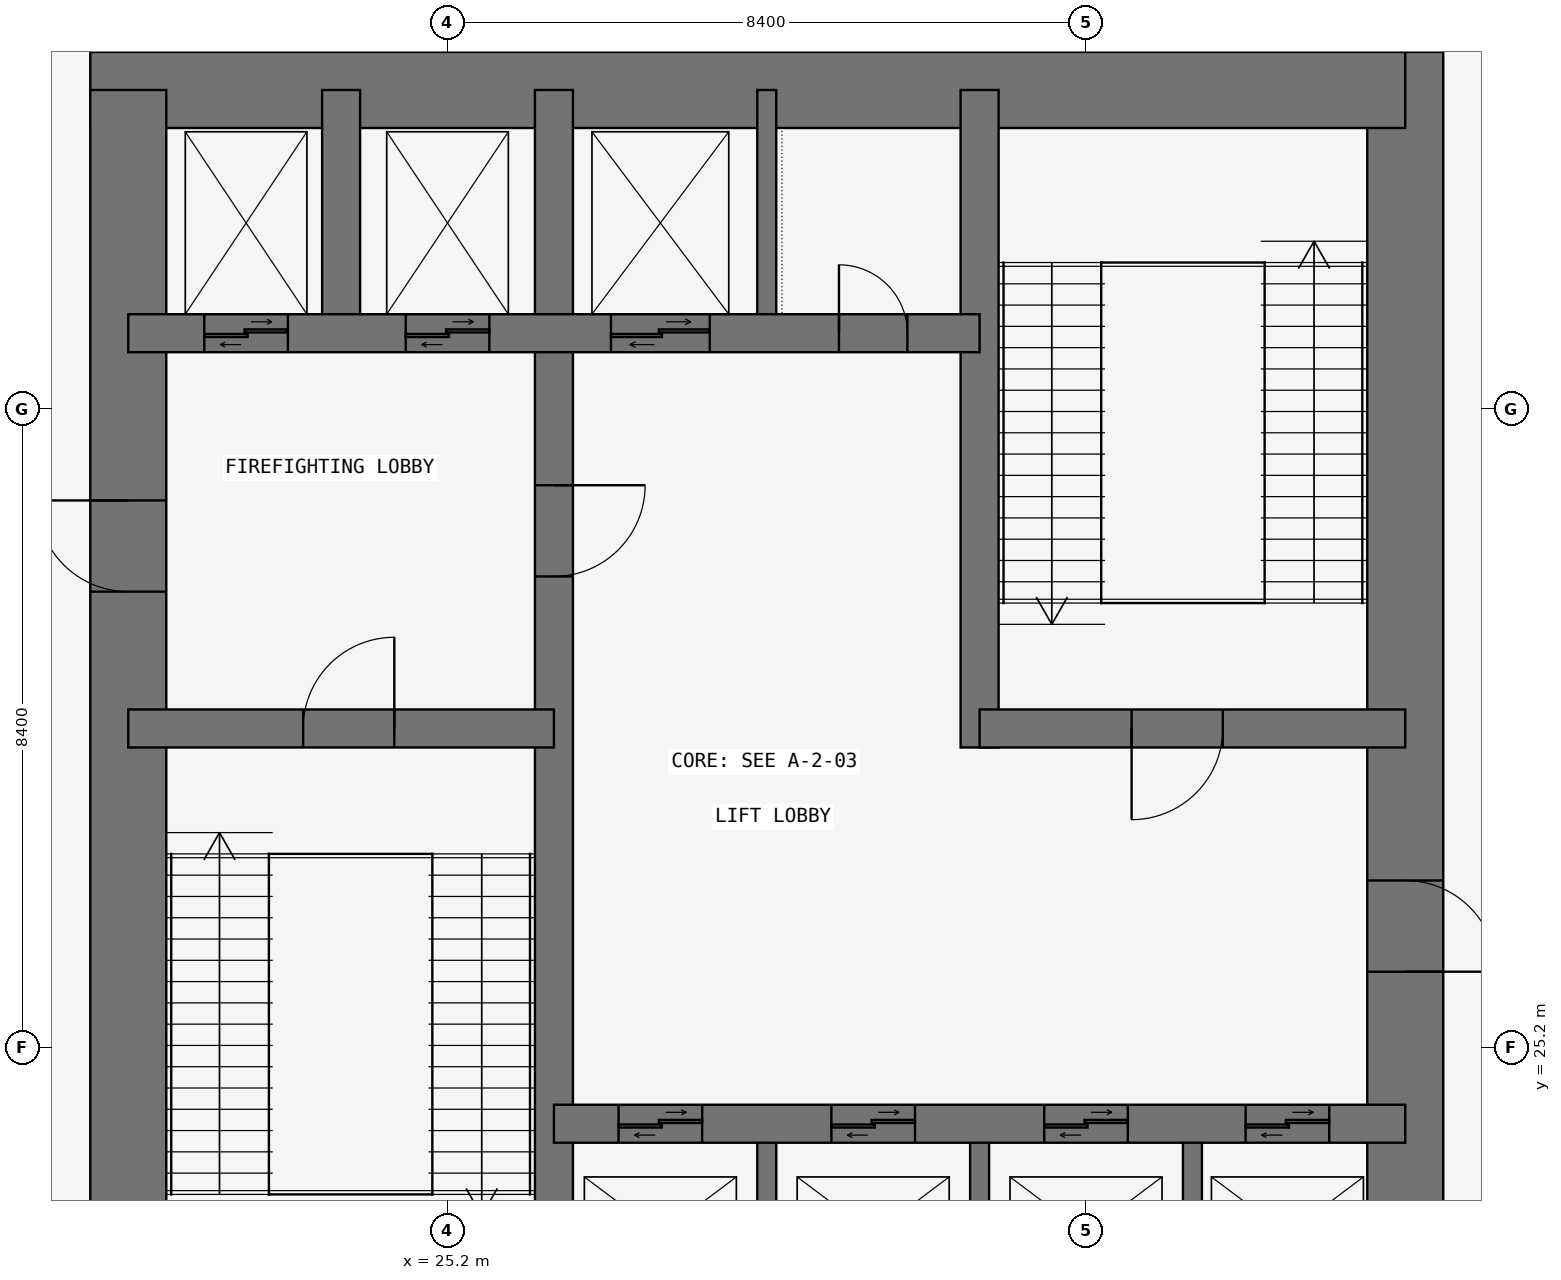
"""IFC4 building model, lengths in metres.
Left out: names, types, materials, properties, quantities, classifications, styles, units other than length and angle.
Written with IfcOpenShell. Run it as: python <this file> out.ifc"""

import sys

from ifc_helpers import new_model, si_unit, direction, frame, frame_2d, origin, place, context, subcontext, project, spatial, rectangle, extrude, element, fill, save


model = new_model("IFC4")
c1 = context("Model", 3, precision=1e-05, world=origin(), true_north=direction((0.0, 1.0)))
c2 = subcontext(c1, "Body", "Model", "MODEL_VIEW")
j1 = project(units=[si_unit("LENGTHUNIT", "METRE"), si_unit("PLANEANGLEUNIT", "RADIAN")], contexts=[c1])
p1 = place(None, origin())
s1 = spatial("IfcSite", under=j1, at=p1, CompositionType="ELEMENT")
p2 = place(p1, origin())
s2 = spatial("IfcBuilding", under=s1, at=p2, CompositionType="ELEMENT")
p3 = place(p2, origin())
s3 = spatial("IfcBuildingStorey", under=s2, at=p3, CompositionType="ELEMENT", Elevation=0.0)
p4 = place(p3, frame((37.8, 21.0, 0.0), z_axis=(0.0, 0.0, 1.0), x_axis=(0.0, 1.0, 0.0)))
e1 = element("IfcWall", 1, at=p4, inside=s3, PredefinedType="SHEAR", context=c2, shape_type="SweptSolid", body=[
    extrude(rectangle(XDim=17.3, YDim=1.0, at=frame_2d((8.65, 0.0))), origin(), (0.0, 0.0, 1.0), 6.0),
])
p5 = place(p4, frame((5.2, 0.0, 0.0)))
e2 = element("IfcOpeningElement", 2, at=p5, cuts=e1, PredefinedType="OPENING", context=c2, shape_type="SweptSolid", body=[
    extrude(rectangle(XDim=1.2, YDim=2.1, at=frame_2d((0.6, 1.05))), frame((0.0, 0.51, 0.0), z_axis=(0.0, -1.0, 0.0), x_axis=(1.0, 0.0, 0.0)), (0.0, 0.0, 1.0), 1.02),
])
p6 = place(p3, frame((37.8, 37.8, 0.0), z_axis=(0.0, 0.0, 1.0), x_axis=(-1.0, 0.0, 0.0)))
e3 = element("IfcWall", 3, at=p6, inside=s3, PredefinedType="SHEAR", context=c2, shape_type="SweptSolid", body=[
    extrude(rectangle(XDim=17.3, YDim=1.0, at=frame_2d((8.65, 0.0))), origin(), (0.0, 0.0, 1.0), 6.0),
])
p7 = place(p3, frame((21.0, 37.8, 0.0), z_axis=(0.0, 0.0, 1.0), x_axis=(0.0, -1.0, 0.0)))
e4 = element("IfcWall", 4, at=p7, inside=s3, PredefinedType="SHEAR", context=c2, shape_type="SweptSolid", body=[
    extrude(rectangle(XDim=17.3, YDim=1.0, at=frame_2d((8.65, 0.0))), origin(), (0.0, 0.0, 1.0), 6.0),
])
p8 = place(p7, frame((5.4, 0.0, 0.0)))
e5 = element("IfcOpeningElement", 5, at=p8, cuts=e4, PredefinedType="OPENING", context=c2, shape_type="SweptSolid", body=[
    extrude(rectangle(XDim=1.2, YDim=2.1, at=frame_2d((0.6, 1.05))), frame((0.0, 0.51, 0.0), z_axis=(0.0, -1.0, 0.0), x_axis=(1.0, 0.0, 0.0)), (0.0, 0.0, 1.0), 1.02),
])
p9 = place(p3, frame((26.6, 21.0, 0.0), z_axis=(0.0, 0.0, 1.0), x_axis=(0.0, 1.0, 0.0)))
e6 = element("IfcWall", 6, at=p9, inside=s3, PredefinedType="SHEAR", context=c2, shape_type="SweptSolid", body=[
    extrude(rectangle(XDim=16.8, YDim=0.5, at=frame_2d((8.4, 0.0))), origin(), (0.0, 0.0, 1.0), 6.0),
])
p10 = place(p9, frame((10.4, 0.0, 0.0)))
e7 = element("IfcOpeningElement", 7, at=p10, cuts=e6, PredefinedType="OPENING", context=c2, shape_type="SweptSolid", body=[
    extrude(rectangle(XDim=1.2, YDim=2.1, at=frame_2d((0.6, 1.05))), frame((0.0, 0.26, 0.0), z_axis=(0.0, -1.0, 0.0), x_axis=(1.0, 0.0, 0.0)), (0.0, 0.0, 1.0), 0.52),
])
p11 = place(p3, frame((21.0, 29.4, 0.0), z_axis=(0.0, 0.0, 1.0), x_axis=(1.0, 0.0, 0.0)))
e8 = element("IfcWall", 8, at=p11, inside=s3, PredefinedType="SHEAR", context=c2, shape_type="SweptSolid", body=[
    extrude(rectangle(XDim=5.6, YDim=0.5, at=frame_2d((2.8, 0.0))), origin(), (0.0, 0.0, 1.0), 6.0),
])
p12 = place(p11, frame((2.3, 0.0, 0.0)))
e9 = element("IfcOpeningElement", 9, at=p12, cuts=e8, PredefinedType="OPENING", context=c2, shape_type="SweptSolid", body=[
    extrude(rectangle(XDim=1.2, YDim=2.1, at=frame_2d((0.6, 1.05))), frame((0.0, 0.26, 0.0), z_axis=(0.0, -1.0, 0.0), x_axis=(1.0, 0.0, 0.0)), (0.0, 0.0, 1.0), 0.52),
])
p13 = place(p3, frame((21.0, 34.6, 0.0), z_axis=(0.0, 0.0, 1.0), x_axis=(1.0, 0.0, 0.0)))
e10 = element("IfcWall", 10, at=p13, inside=s3, PredefinedType="SHEAR", context=c2, shape_type="SweptSolid", body=[
    extrude(rectangle(XDim=11.2, YDim=0.5, at=frame_2d((5.6, 0.0))), origin(), (0.0, 0.0, 1.0), 6.0),
])
p14 = place(p13, frame((9.35, 0.0, 0.0)))
e11 = element("IfcOpeningElement", 11, at=p14, cuts=e10, PredefinedType="OPENING", context=c2, shape_type="SweptSolid", body=[
    extrude(rectangle(XDim=0.9, YDim=2.1, at=frame_2d((0.45, 1.05))), frame((0.0, 0.26, 0.0), z_axis=(0.0, -1.0, 0.0), x_axis=(1.0, 0.0, 0.0)), (0.0, 0.0, 1.0), 0.52),
])
p15 = place(p13, frame((1.0, 0.0, 0.0)))
e12 = element("IfcOpeningElement", 12, at=p15, cuts=e10, PredefinedType="OPENING", context=c2, shape_type="SweptSolid", body=[
    extrude(rectangle(XDim=1.1, YDim=2.1, at=frame_2d((0.55, 1.05))), frame((0.0, 0.26, 0.0), z_axis=(0.0, -1.0, 0.0), x_axis=(1.0, 0.0, 0.0)), (0.0, 0.0, 1.0), 0.52),
])
p16 = place(p13, frame((3.65, 0.0, 0.0)))
e13 = element("IfcOpeningElement", 13, at=p16, cuts=e10, PredefinedType="OPENING", context=c2, shape_type="SweptSolid", body=[
    extrude(rectangle(XDim=1.1, YDim=2.1, at=frame_2d((0.55, 1.05))), frame((0.0, 0.26, 0.0), z_axis=(0.0, -1.0, 0.0), x_axis=(1.0, 0.0, 0.0)), (0.0, 0.0, 1.0), 0.52),
])
p17 = place(p13, frame((6.35, 0.0, 0.0)))
e14 = element("IfcOpeningElement", 14, at=p17, cuts=e10, PredefinedType="OPENING", context=c2, shape_type="SweptSolid", body=[
    extrude(rectangle(XDim=1.3, YDim=2.1, at=frame_2d((0.65, 1.05))), frame((0.0, 0.26, 0.0), z_axis=(0.0, -1.0, 0.0), x_axis=(1.0, 0.0, 0.0)), (0.0, 0.0, 1.0), 0.52),
])
p18 = place(p3, frame((23.8, 34.6, 0.0), z_axis=(0.0, 0.0, 1.0), x_axis=(0.0, 1.0, 0.0)))
e15 = element("IfcWall", 15, at=p18, inside=s3, PredefinedType="SHEAR", context=c2, shape_type="SweptSolid", body=[
    extrude(rectangle(XDim=3.2, YDim=0.5, at=frame_2d((1.6, 0.0))), origin(), (0.0, 0.0, 1.0), 6.0),
])
p19 = place(p3, frame((26.6, 24.2, 0.0), z_axis=(0.0, 0.0, 1.0), x_axis=(1.0, 0.0, 0.0)))
e16 = element("IfcWall", 16, at=p19, inside=s3, PredefinedType="SHEAR", context=c2, shape_type="SweptSolid", body=[
    extrude(rectangle(XDim=11.2, YDim=0.5, at=frame_2d((5.6, 0.0))), origin(), (0.0, 0.0, 1.0), 6.0),
])
p20 = place(p19, frame((0.85, 0.0, 0.0)))
e17 = element("IfcOpeningElement", 17, at=p20, cuts=e16, PredefinedType="OPENING", context=c2, shape_type="SweptSolid", body=[
    extrude(rectangle(XDim=1.1, YDim=2.1, at=frame_2d((0.55, 1.05))), frame((0.0, 0.26, 0.0), z_axis=(0.0, -1.0, 0.0), x_axis=(1.0, 0.0, 0.0)), (0.0, 0.0, 1.0), 0.52),
])
p21 = place(p19, frame((3.65, 0.0, 0.0)))
e18 = element("IfcOpeningElement", 18, at=p21, cuts=e16, PredefinedType="OPENING", context=c2, shape_type="SweptSolid", body=[
    extrude(rectangle(XDim=1.1, YDim=2.1, at=frame_2d((0.55, 1.05))), frame((0.0, 0.26, 0.0), z_axis=(0.0, -1.0, 0.0), x_axis=(1.0, 0.0, 0.0)), (0.0, 0.0, 1.0), 0.52),
])
p22 = place(p19, frame((6.45, 0.0, 0.0)))
e19 = element("IfcOpeningElement", 19, at=p22, cuts=e16, PredefinedType="OPENING", context=c2, shape_type="SweptSolid", body=[
    extrude(rectangle(XDim=1.1, YDim=2.1, at=frame_2d((0.55, 1.05))), frame((0.0, 0.26, 0.0), z_axis=(0.0, -1.0, 0.0), x_axis=(1.0, 0.0, 0.0)), (0.0, 0.0, 1.0), 0.52),
])
p23 = place(p19, frame((9.1, 0.0, 0.0)))
e20 = element("IfcOpeningElement", 20, at=p23, cuts=e16, PredefinedType="OPENING", context=c2, shape_type="SweptSolid", body=[
    extrude(rectangle(XDim=1.1, YDim=2.1, at=frame_2d((0.55, 1.05))), frame((0.0, 0.26, 0.0), z_axis=(0.0, -1.0, 0.0), x_axis=(1.0, 0.0, 0.0)), (0.0, 0.0, 1.0), 0.52),
])
p24 = place(p3, frame((32.2, 29.15, 0.0), z_axis=(0.0, 0.0, 1.0), x_axis=(0.0, 1.0, 0.0)))
e21 = element("IfcWall", 21, at=p24, inside=s3, PredefinedType="SHEAR", context=c2, shape_type="SweptSolid", body=[
    extrude(rectangle(XDim=8.65, YDim=0.5, at=frame_2d((4.325, 0.0))), origin(), (0.0, 0.0, 1.0), 6.0),
])
p25 = place(p3, frame((32.2, 29.4, 0.0), z_axis=(0.0, 0.0, 1.0), x_axis=(1.0, 0.0, 0.0)))
e22 = element("IfcWall", 22, at=p25, inside=s3, PredefinedType="SHEAR", context=c2, shape_type="SweptSolid", body=[
    extrude(rectangle(XDim=5.6, YDim=0.5, at=frame_2d((2.8, 0.0))), origin(), (0.0, 0.0, 1.0), 6.0),
])
p26 = place(p25, frame((2.0, 0.0, 0.0)))
e23 = element("IfcOpeningElement", 23, at=p26, cuts=e22, PredefinedType="OPENING", context=c2, shape_type="SweptSolid", body=[
    extrude(rectangle(XDim=1.2, YDim=2.1, at=frame_2d((0.6, 1.05))), frame((0.0, 0.26, 0.0), z_axis=(0.0, -1.0, 0.0), x_axis=(1.0, 0.0, 0.0)), (0.0, 0.0, 1.0), 0.52),
])
for number, where, z_axis, x_axis in (
    (24, (29.4, 21.0, 0.0), (0.0, 0.0, 1.0), (0.0, 1.0, 0.0)),
    (25, (32.2, 21.0, 0.0), (0.0, 0.0, 1.0), (0.0, 1.0, 0.0)),
    (26, (35.0, 21.0, 0.0), (0.0, 0.0, 1.0), (0.0, 1.0, 0.0)),
    (27, (29.4, 34.6, 0.0), (0.0, 0.0, 1.0), (0.0, 1.0, 0.0)),
):
    element("IfcWall", number, at=place(p3, frame(where, z_axis=z_axis, x_axis=x_axis)), inside=s3, PredefinedType="SHEAR", context=c2, shape_type="SweptSolid", body=[
        extrude(rectangle(XDim=3.2, YDim=0.25, at=frame_2d((1.6, 0.0))), origin(), (0.0, 0.0, 1.0), 6.0),
    ])
p27 = place(p8, frame((1.2, 0.0, 0.0), z_axis=(0.0, 0.0, 1.0), x_axis=(-1.0, 0.0, 0.0)))
e28 = element("IfcDoor", 28, at=p27, inside=s3, OperationType="SINGLE_SWING_RIGHT", PredefinedType="DOOR", context=c2, shape_type="SweptSolid", body=[
    extrude(rectangle(XDim=1.2, YDim=2.1, at=frame_2d((0.6, 1.05))), frame((0.0, 0.025, 0.0), z_axis=(0.0, -1.0, 0.0), x_axis=(1.0, 0.0, 0.0)), (0.0, 0.0, 1.0), 0.05),
])
fill(e5, e28)
p28 = place(p12, origin())
e29 = element("IfcDoor", 29, at=p28, inside=s3, OperationType="SINGLE_SWING_RIGHT", PredefinedType="DOOR", context=c2, shape_type="SweptSolid", body=[
    extrude(rectangle(XDim=1.2, YDim=2.1, at=frame_2d((0.6, 1.05))), frame((0.0, 0.025, 0.0), z_axis=(0.0, -1.0, 0.0), x_axis=(1.0, 0.0, 0.0)), (0.0, 0.0, 1.0), 0.05),
])
fill(e9, e29)
p29 = place(p10, frame((1.2, 0.0, 0.0), z_axis=(0.0, 0.0, 1.0), x_axis=(-1.0, 0.0, 0.0)))
e30 = element("IfcDoor", 30, at=p29, inside=s3, OperationType="SINGLE_SWING_LEFT", PredefinedType="DOOR", context=c2, shape_type="SweptSolid", body=[
    extrude(rectangle(XDim=1.2, YDim=2.1, at=frame_2d((0.6, 1.05))), frame((0.0, 0.025, 0.0), z_axis=(0.0, -1.0, 0.0), x_axis=(1.0, 0.0, 0.0)), (0.0, 0.0, 1.0), 0.05),
])
fill(e7, e30)
p30 = place(p5, frame((1.2, 0.0, 0.0), z_axis=(0.0, 0.0, 1.0), x_axis=(-1.0, 0.0, 0.0)))
e31 = element("IfcDoor", 31, at=p30, inside=s3, OperationType="SINGLE_SWING_RIGHT", PredefinedType="DOOR", context=c2, shape_type="SweptSolid", body=[
    extrude(rectangle(XDim=1.2, YDim=2.1, at=frame_2d((0.6, 1.05))), frame((0.0, 0.025, 0.0), z_axis=(0.0, -1.0, 0.0), x_axis=(1.0, 0.0, 0.0)), (0.0, 0.0, 1.0), 0.05),
])
fill(e2, e31)
p31 = place(p26, frame((1.2, 0.0, 0.0), z_axis=(0.0, 0.0, 1.0), x_axis=(-1.0, 0.0, 0.0)))
e32 = element("IfcDoor", 32, at=p31, inside=s3, OperationType="SINGLE_SWING_RIGHT", PredefinedType="DOOR", context=c2, shape_type="SweptSolid", body=[
    extrude(rectangle(XDim=1.2, YDim=2.1, at=frame_2d((0.6, 1.05))), frame((0.0, 0.025, 0.0), z_axis=(0.0, -1.0, 0.0), x_axis=(1.0, 0.0, 0.0)), (0.0, 0.0, 1.0), 0.05),
])
fill(e23, e32)
p32 = place(p14, origin())
e33 = element("IfcDoor", 33, at=p32, inside=s3, OperationType="SINGLE_SWING_LEFT", PredefinedType="DOOR", context=c2, shape_type="SweptSolid", body=[
    extrude(rectangle(XDim=0.9, YDim=2.1, at=frame_2d((0.45, 1.05))), frame((0.0, 0.025, 0.0), z_axis=(0.0, -1.0, 0.0), x_axis=(1.0, 0.0, 0.0)), (0.0, 0.0, 1.0), 0.05),
])
fill(e11, e33)
p33 = place(p20, origin())
e34 = element("IfcDoor", 34, at=p33, inside=s3, OperationType="DOUBLE_DOOR_SLIDING", PredefinedType="DOOR", context=c2, shape_type="SweptSolid", body=[
    extrude(rectangle(XDim=1.1, YDim=2.1, at=frame_2d((0.55, 1.05))), frame((0.0, 0.025, 0.0), z_axis=(0.0, -1.0, 0.0), x_axis=(1.0, 0.0, 0.0)), (0.0, 0.0, 1.0), 0.05),
])
fill(e17, e34)
p34 = place(p21, origin())
e35 = element("IfcDoor", 35, at=p34, inside=s3, OperationType="DOUBLE_DOOR_SLIDING", PredefinedType="DOOR", context=c2, shape_type="SweptSolid", body=[
    extrude(rectangle(XDim=1.1, YDim=2.1, at=frame_2d((0.55, 1.05))), frame((0.0, 0.025, 0.0), z_axis=(0.0, -1.0, 0.0), x_axis=(1.0, 0.0, 0.0)), (0.0, 0.0, 1.0), 0.05),
])
fill(e18, e35)
p35 = place(p22, origin())
e36 = element("IfcDoor", 36, at=p35, inside=s3, OperationType="DOUBLE_DOOR_SLIDING", PredefinedType="DOOR", context=c2, shape_type="SweptSolid", body=[
    extrude(rectangle(XDim=1.1, YDim=2.1, at=frame_2d((0.55, 1.05))), frame((0.0, 0.025, 0.0), z_axis=(0.0, -1.0, 0.0), x_axis=(1.0, 0.0, 0.0)), (0.0, 0.0, 1.0), 0.05),
])
fill(e19, e36)
p36 = place(p23, origin())
e37 = element("IfcDoor", 37, at=p36, inside=s3, OperationType="DOUBLE_DOOR_SLIDING", PredefinedType="DOOR", context=c2, shape_type="SweptSolid", body=[
    extrude(rectangle(XDim=1.1, YDim=2.1, at=frame_2d((0.55, 1.05))), frame((0.0, 0.025, 0.0), z_axis=(0.0, -1.0, 0.0), x_axis=(1.0, 0.0, 0.0)), (0.0, 0.0, 1.0), 0.05),
])
fill(e20, e37)
p37 = place(p15, origin())
e38 = element("IfcDoor", 38, at=p37, inside=s3, OperationType="DOUBLE_DOOR_SLIDING", PredefinedType="DOOR", context=c2, shape_type="SweptSolid", body=[
    extrude(rectangle(XDim=1.1, YDim=2.1, at=frame_2d((0.55, 1.05))), frame((0.0, 0.025, 0.0), z_axis=(0.0, -1.0, 0.0), x_axis=(1.0, 0.0, 0.0)), (0.0, 0.0, 1.0), 0.05),
])
fill(e12, e38)
p38 = place(p16, origin())
e39 = element("IfcDoor", 39, at=p38, inside=s3, OperationType="DOUBLE_DOOR_SLIDING", PredefinedType="DOOR", context=c2, shape_type="SweptSolid", body=[
    extrude(rectangle(XDim=1.1, YDim=2.1, at=frame_2d((0.55, 1.05))), frame((0.0, 0.025, 0.0), z_axis=(0.0, -1.0, 0.0), x_axis=(1.0, 0.0, 0.0)), (0.0, 0.0, 1.0), 0.05),
])
fill(e13, e39)
p39 = place(p17, origin())
e40 = element("IfcDoor", 40, at=p39, inside=s3, OperationType="DOUBLE_DOOR_SLIDING", PredefinedType="DOOR", context=c2, shape_type="SweptSolid", body=[
    extrude(rectangle(XDim=1.3, YDim=2.1, at=frame_2d((0.65, 1.05))), frame((0.0, 0.025, 0.0), z_axis=(0.0, -1.0, 0.0), x_axis=(1.0, 0.0, 0.0)), (0.0, 0.0, 1.0), 0.05),
])
fill(e14, e40)
save(model, sys.argv[1])
